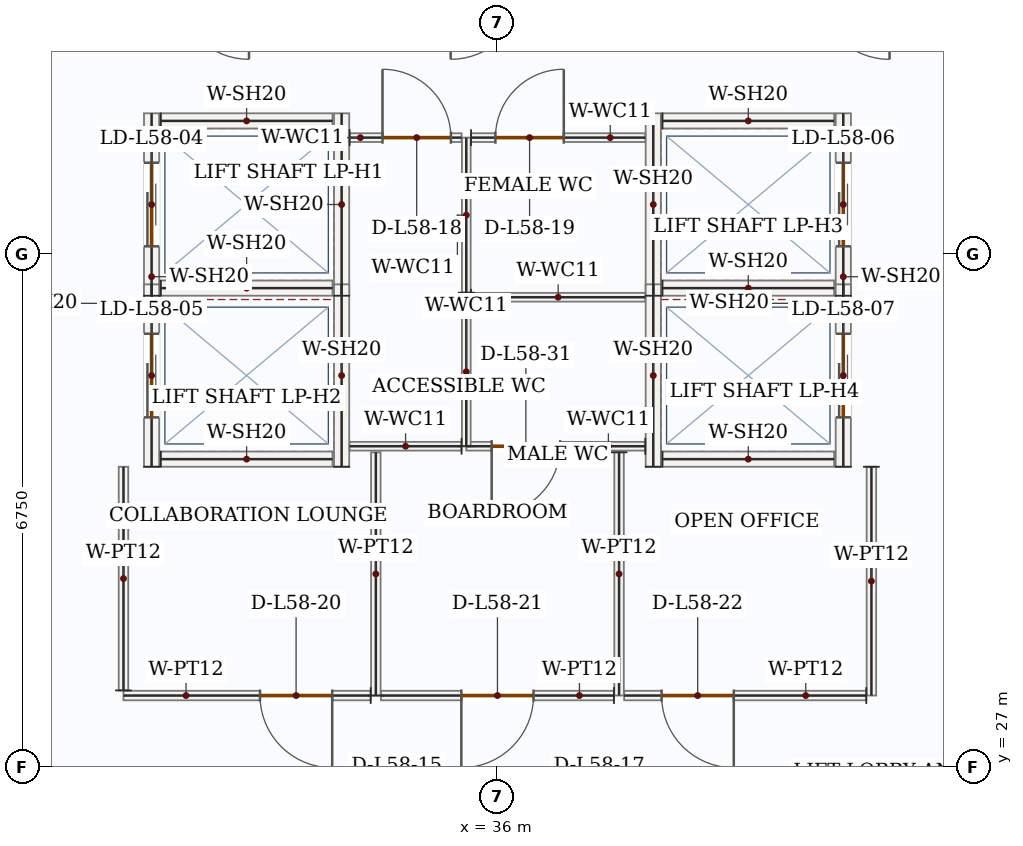
"""IFC4 building model, lengths in metres.
Left out: names, types, materials, properties, quantities, classifications, styles, units other than length and angle.
Written with IfcOpenShell. Run it as: python <this file> out.ifc"""

import sys

from ifc_helpers import new_model, si_unit, direction, frame, frame_2d, origin, place, context, subcontext, project, spatial, rectangle, extrude, source, transform, mapped, element, fill, save


model = new_model("IFC4")
c1 = context("Model", 3, precision=1e-05, world=origin(), true_north=direction((0.0, 1.0)))
c2 = subcontext(c1, "Body", "Model", "MODEL_VIEW")
j1 = project(units=[si_unit("LENGTHUNIT", "METRE"), si_unit("PLANEANGLEUNIT", "RADIAN")], contexts=[c1])
p1 = place(None, origin())
s1 = spatial("IfcSite", under=j1, at=p1, CompositionType="ELEMENT")
p2 = place(p1, origin())
s2 = spatial("IfcBuilding", under=s1, at=p2, CompositionType="ELEMENT")
p3 = place(p2, frame((0.0, 0.0, 246.6)))
s3 = spatial("IfcBuildingStorey", under=s2, at=p3, CompositionType="ELEMENT", Elevation=246.6)
p4 = place(p3, frame((31.45, 33.2, 0.0), z_axis=(0.0, 0.0, 1.0), x_axis=(0.0, 1.0, 0.0)))
e1 = element("IfcWall", 1, at=p4, inside=s3, PredefinedType="SOLIDWALL", context=c2, shape_type="SweptSolid", body=[
    extrude(rectangle(XDim=2.4, YDim=0.2, at=frame_2d((1.2, 0.0))), origin(), (0.0, 0.0, 1.0), 3.5),
])
p5 = place(p4, frame((0.65, 0.0, 0.0)))
e2 = element("IfcOpeningElement", 2, at=p5, cuts=e1, PredefinedType="OPENING", context=c2, shape_type="SweptSolid", body=[
    extrude(rectangle(XDim=1.1, YDim=2.15, at=frame_2d((0.55, 1.075))), frame((0.0, 0.11, 0.0), z_axis=(0.0, -1.0, 0.0), x_axis=(1.0, 0.0, 0.0)), (0.0, 0.0, 1.0), 0.22),
])
m1 = source(origin(), c2, "Body", "SweptSolid", [
    extrude(rectangle(XDim=2.4, YDim=0.2, at=frame_2d((1.2, 0.0))), origin(), (0.0, 0.0, 1.0), 3.5),
])
p6 = place(p3, frame((33.95, 33.2, 0.0), z_axis=(0.0, 0.0, 1.0), x_axis=(0.0, 1.0, 0.0)))
e3 = element("IfcWall", 3, at=p6, inside=s3, PredefinedType="SOLIDWALL", context=c2, shape_type="MappedRepresentation", body=[
    mapped(m1, transform((0.0, 0.0, 0.0), x_axis=(1.0, 0.0, 0.0), y_axis=(0.0, 1.0, 0.0), z_axis=(0.0, 0.0, 1.0), scale=1.0)),
])
m2 = source(origin(), c2, "Body", "SweptSolid", [
    extrude(rectangle(XDim=2.26, YDim=0.2, at=frame_2d((1.13, 0.0))), origin(), (0.0, 0.0, 1.0), 3.5),
])
for number, where, z_axis, x_axis in (
    (4, (31.57, 33.3, 0.0), (0.0, 0.0, 1.0), (1.0, 0.0, 0.0)),
    (5, (31.57, 35.5, 0.0), (0.0, 0.0, 1.0), (1.0, 0.0, 0.0)),
):
    element("IfcWall", number, at=place(p3, frame(where, z_axis=z_axis, x_axis=x_axis)), inside=s3, PredefinedType="SOLIDWALL", context=c2, shape_type="MappedRepresentation", body=[
        mapped(m2, transform((0.0, 0.0, 0.0), x_axis=(1.0, 0.0, 0.0), y_axis=(0.0, 1.0, 0.0), z_axis=(0.0, 0.0, 1.0), scale=1.0)),
    ])
p7 = place(p3, frame((31.45, 30.95, 0.0), z_axis=(0.0, 0.0, 1.0), x_axis=(0.0, 1.0, 0.0)))
e6 = element("IfcWall", 6, at=p7, inside=s3, PredefinedType="SOLIDWALL", context=c2, shape_type="SweptSolid", body=[
    extrude(rectangle(XDim=2.4, YDim=0.2, at=frame_2d((1.2, 0.0))), origin(), (0.0, 0.0, 1.0), 3.5),
])
p8 = place(p7, frame((0.65, 0.0, 0.0)))
e7 = element("IfcOpeningElement", 7, at=p8, cuts=e6, PredefinedType="OPENING", context=c2, shape_type="SweptSolid", body=[
    extrude(rectangle(XDim=1.1, YDim=2.15, at=frame_2d((0.55, 1.075))), frame((0.0, 0.11, 0.0), z_axis=(0.0, -1.0, 0.0), x_axis=(1.0, 0.0, 0.0)), (0.0, 0.0, 1.0), 0.22),
])
p9 = place(p3, frame((33.95, 30.95, 0.0), z_axis=(0.0, 0.0, 1.0), x_axis=(0.0, 1.0, 0.0)))
e8 = element("IfcWall", 8, at=p9, inside=s3, PredefinedType="SOLIDWALL", context=c2, shape_type="MappedRepresentation", body=[
    mapped(m1, transform((0.0, 0.0, 0.0), x_axis=(1.0, 0.0, 0.0), y_axis=(0.0, 1.0, 0.0), z_axis=(0.0, 0.0, 1.0), scale=1.0)),
])
p10 = place(p3, frame((31.57, 31.05, 0.0), z_axis=(0.0, 0.0, 1.0), x_axis=(1.0, 0.0, 0.0)))
e9 = element("IfcWall", 9, at=p10, inside=s3, PredefinedType="SOLIDWALL", context=c2, shape_type="MappedRepresentation", body=[
    mapped(m2, transform((0.0, 0.0, 0.0), x_axis=(1.0, 0.0, 0.0), y_axis=(0.0, 1.0, 0.0), z_axis=(0.0, 0.0, 1.0), scale=1.0)),
])
p11 = place(p3, frame((38.05, 33.2, 0.0), z_axis=(0.0, 0.0, 1.0), x_axis=(0.0, 1.0, 0.0)))
e10 = element("IfcWall", 10, at=p11, inside=s3, PredefinedType="SOLIDWALL", context=c2, shape_type="MappedRepresentation", body=[
    mapped(m1, transform((0.0, 0.0, 0.0), x_axis=(1.0, 0.0, 0.0), y_axis=(0.0, 1.0, 0.0), z_axis=(0.0, 0.0, 1.0), scale=1.0)),
])
p12 = place(p3, frame((40.55, 33.2, 0.0), z_axis=(0.0, 0.0, 1.0), x_axis=(0.0, 1.0, 0.0)))
e11 = element("IfcWall", 11, at=p12, inside=s3, PredefinedType="SOLIDWALL", context=c2, shape_type="SweptSolid", body=[
    extrude(rectangle(XDim=2.4, YDim=0.2, at=frame_2d((1.2, 0.0))), origin(), (0.0, 0.0, 1.0), 3.5),
])
p13 = place(p12, frame((0.65, 0.0, 0.0)))
e12 = element("IfcOpeningElement", 12, at=p13, cuts=e11, PredefinedType="OPENING", context=c2, shape_type="SweptSolid", body=[
    extrude(rectangle(XDim=1.1, YDim=2.15, at=frame_2d((0.55, 1.075))), frame((0.0, 0.11, 0.0), z_axis=(0.0, -1.0, 0.0), x_axis=(1.0, 0.0, 0.0)), (0.0, 0.0, 1.0), 0.22),
])
for number, where, z_axis, x_axis in (
    (13, (38.17, 33.3, 0.0), (0.0, 0.0, 1.0), (1.0, 0.0, 0.0)),
    (14, (38.17, 35.5, 0.0), (0.0, 0.0, 1.0), (1.0, 0.0, 0.0)),
):
    element("IfcWall", number, at=place(p3, frame(where, z_axis=z_axis, x_axis=x_axis)), inside=s3, PredefinedType="SOLIDWALL", context=c2, shape_type="MappedRepresentation", body=[
        mapped(m2, transform((0.0, 0.0, 0.0), x_axis=(1.0, 0.0, 0.0), y_axis=(0.0, 1.0, 0.0), z_axis=(0.0, 0.0, 1.0), scale=1.0)),
    ])
p14 = place(p3, frame((38.05, 30.95, 0.0), z_axis=(0.0, 0.0, 1.0), x_axis=(0.0, 1.0, 0.0)))
e15 = element("IfcWall", 15, at=p14, inside=s3, PredefinedType="SOLIDWALL", context=c2, shape_type="MappedRepresentation", body=[
    mapped(m1, transform((0.0, 0.0, 0.0), x_axis=(1.0, 0.0, 0.0), y_axis=(0.0, 1.0, 0.0), z_axis=(0.0, 0.0, 1.0), scale=1.0)),
])
p15 = place(p3, frame((40.55, 30.95, 0.0), z_axis=(0.0, 0.0, 1.0), x_axis=(0.0, 1.0, 0.0)))
e16 = element("IfcWall", 16, at=p15, inside=s3, PredefinedType="SOLIDWALL", context=c2, shape_type="SweptSolid", body=[
    extrude(rectangle(XDim=2.4, YDim=0.2, at=frame_2d((1.2, 0.0))), origin(), (0.0, 0.0, 1.0), 3.5),
])
p16 = place(p15, frame((0.65, 0.0, 0.0)))
e17 = element("IfcOpeningElement", 17, at=p16, cuts=e16, PredefinedType="OPENING", context=c2, shape_type="SweptSolid", body=[
    extrude(rectangle(XDim=1.1, YDim=2.15, at=frame_2d((0.55, 1.075))), frame((0.0, 0.11, 0.0), z_axis=(0.0, -1.0, 0.0), x_axis=(1.0, 0.0, 0.0)), (0.0, 0.0, 1.0), 0.22),
])
p17 = place(p3, frame((38.17, 31.05, 0.0), z_axis=(0.0, 0.0, 1.0), x_axis=(1.0, 0.0, 0.0)))
e18 = element("IfcWall", 18, at=p17, inside=s3, PredefinedType="SOLIDWALL", context=c2, shape_type="MappedRepresentation", body=[
    mapped(m2, transform((0.0, 0.0, 0.0), x_axis=(1.0, 0.0, 0.0), y_axis=(0.0, 1.0, 0.0), z_axis=(0.0, 0.0, 1.0), scale=1.0)),
])
p18 = place(p3, frame((37.945, 31.22, 0.0), z_axis=(0.0, 0.0, 1.0), x_axis=(-1.0, 0.0, 0.0)))
e19 = element("IfcWall", 19, at=p18, inside=s3, PredefinedType="PARTITIONING", context=c2, shape_type="SweptSolid", body=[
    extrude(rectangle(XDim=2.355, YDim=0.115, at=frame_2d((1.177, 0.0))), origin(), (0.0, 0.0, 1.0), 3.5),
])
p19 = place(p18, frame((1.121, 0.0, 0.0)))
e20 = element("IfcOpeningElement", 20, at=p19, cuts=e19, PredefinedType="OPENING", context=c2, shape_type="SweptSolid", body=[
    extrude(rectangle(XDim=0.9, YDim=2.1, at=frame_2d((0.45, 1.05))), frame((0.0, 0.067, 0.0), z_axis=(0.0, -1.0, 0.0), x_axis=(1.0, 0.0, 0.0)), (0.0, 0.0, 1.0), 0.135),
])
m3 = source(origin(), c2, "Body", "SweptSolid", [
    extrude(rectangle(XDim=1.96, YDim=0.115, at=frame_2d((0.98, 0.0))), origin(), (0.0, 0.0, 1.0), 3.5),
])
p20 = place(p3, frame((35.59, 31.22, 0.0), z_axis=(0.0, 0.0, 1.0), x_axis=(0.0, 1.0, 0.0)))
e21 = element("IfcWall", 21, at=p20, inside=s3, PredefinedType="PARTITIONING", context=c2, shape_type="MappedRepresentation", body=[
    mapped(m3, transform((0.0, 0.0, 0.0), x_axis=(1.0, 0.0, 0.0), y_axis=(0.0, 1.0, 0.0), z_axis=(0.0, 0.0, 1.0), scale=1.0)),
])
m4 = source(origin(), c2, "Body", "SweptSolid", [
    extrude(rectangle(XDim=2.292, YDim=0.115, at=frame_2d((1.146, 0.0))), origin(), (0.0, 0.0, 1.0), 3.5),
])
p21 = place(p3, frame((35.653, 33.18, 0.0), z_axis=(0.0, 0.0, 1.0), x_axis=(1.0, 0.0, 0.0)))
e22 = element("IfcWall", 22, at=p21, inside=s3, PredefinedType="PARTITIONING", context=c2, shape_type="MappedRepresentation", body=[
    mapped(m4, transform((0.0, 0.0, 0.0), x_axis=(1.0, 0.0, 0.0), y_axis=(0.0, 1.0, 0.0), z_axis=(0.0, 0.0, 1.0), scale=1.0)),
])
m5 = source(origin(), c2, "Body", "SweptSolid", [
    extrude(rectangle(XDim=2.04, YDim=0.115, at=frame_2d((1.02, 0.0))), origin(), (0.0, 0.0, 1.0), 3.5),
])
p22 = place(p3, frame((35.59, 33.24, 0.0), z_axis=(0.0, 0.0, 1.0), x_axis=(0.0, 1.0, 0.0)))
e23 = element("IfcWall", 23, at=p22, inside=s3, PredefinedType="PARTITIONING", context=c2, shape_type="MappedRepresentation", body=[
    mapped(m5, transform((0.0, 0.0, 0.0), x_axis=(1.0, 0.0, 0.0), y_axis=(0.0, 1.0, 0.0), z_axis=(0.0, 0.0, 1.0), scale=1.0)),
])
p23 = place(p3, frame((35.653, 35.28, 0.0), z_axis=(0.0, 0.0, 1.0), x_axis=(1.0, 0.0, 0.0)))
e24 = element("IfcWall", 24, at=p23, inside=s3, PredefinedType="PARTITIONING", context=c2, shape_type="SweptSolid", body=[
    extrude(rectangle(XDim=2.292, YDim=0.115, at=frame_2d((1.146, 0.0))), origin(), (0.0, 0.0, 1.0), 3.5),
])
p24 = place(p23, frame((0.32, 0.0, 0.0)))
e25 = element("IfcOpeningElement", 25, at=p24, cuts=e24, PredefinedType="OPENING", context=c2, shape_type="SweptSolid", body=[
    extrude(rectangle(XDim=0.9, YDim=2.1, at=frame_2d((0.45, 1.05))), frame((0.0, 0.067, 0.0), z_axis=(0.0, -1.0, 0.0), x_axis=(1.0, 0.0, 0.0)), (0.0, 0.0, 1.0), 0.135),
])
m6 = source(origin(), c2, "Body", "SweptSolid", [
    extrude(rectangle(XDim=1.473, YDim=0.115, at=frame_2d((0.736, 0.0))), origin(), (0.0, 0.0, 1.0), 3.5),
])
p25 = place(p3, frame((35.528, 31.22, 0.0), z_axis=(0.0, 0.0, 1.0), x_axis=(-1.0, 0.0, 0.0)))
e26 = element("IfcWall", 26, at=p25, inside=s3, PredefinedType="PARTITIONING", context=c2, shape_type="MappedRepresentation", body=[
    mapped(m6, transform((0.0, 0.0, 0.0), x_axis=(1.0, 0.0, 0.0), y_axis=(0.0, 1.0, 0.0), z_axis=(0.0, 0.0, 1.0), scale=1.0)),
])
p26 = place(p3, frame((34.055, 35.28, 0.0), z_axis=(0.0, 0.0, 1.0), x_axis=(1.0, 0.0, 0.0)))
e27 = element("IfcWall", 27, at=p26, inside=s3, PredefinedType="PARTITIONING", context=c2, shape_type="SweptSolid", body=[
    extrude(rectangle(XDim=1.473, YDim=0.115, at=frame_2d((0.736, 0.0))), origin(), (0.0, 0.0, 1.0), 3.5),
])
p27 = place(p26, frame((0.433, 0.0, 0.0)))
e28 = element("IfcOpeningElement", 28, at=p27, cuts=e27, PredefinedType="OPENING", context=c2, shape_type="SweptSolid", body=[
    extrude(rectangle(XDim=0.9, YDim=2.1, at=frame_2d((0.45, 1.05))), frame((0.0, 0.067, 0.0), z_axis=(0.0, -1.0, 0.0), x_axis=(1.0, 0.0, 0.0)), (0.0, 0.0, 1.0), 0.135),
])
m7 = source(origin(), c2, "Body", "SweptSolid", [
    extrude(rectangle(XDim=3.2, YDim=0.125, at=frame_2d((1.6, 0.0))), origin(), (0.0, 0.0, 1.0), 3.5),
])
for number, where, z_axis, x_axis in (
    (29, (34.4, 27.94, 0.0), (0.0, 0.0, 1.0), (0.0, 1.0, 0.0)),
    (30, (37.6, 31.14, 0.0), (0.0, 0.0, 1.0), (0.0, -1.0, 0.0)),
):
    element("IfcWall", number, at=place(p3, frame(where, z_axis=z_axis, x_axis=x_axis)), inside=s3, PredefinedType="PARTITIONING", context=c2, shape_type="MappedRepresentation", body=[
        mapped(m7, transform((0.0, 0.0, 0.0), x_axis=(1.0, 0.0, 0.0), y_axis=(0.0, 1.0, 0.0), z_axis=(0.0, 0.0, 1.0), scale=1.0)),
    ])
p28 = place(p3, frame((37.532, 27.94, 0.0), z_axis=(0.0, 0.0, 1.0), x_axis=(-1.0, 0.0, 0.0)))
e31 = element("IfcWall", 31, at=p28, inside=s3, PredefinedType="PARTITIONING", context=c2, shape_type="SweptSolid", body=[
    extrude(rectangle(XDim=3.065, YDim=0.125, at=frame_2d((1.532, 0.0))), origin(), (0.0, 0.0, 1.0), 3.5),
])
p29 = place(p28, frame((1.058, 0.0, 0.0)))
e32 = element("IfcOpeningElement", 32, at=p29, cuts=e31, PredefinedType="OPENING", context=c2, shape_type="SweptSolid", body=[
    extrude(rectangle(XDim=0.95, YDim=2.15, at=frame_2d((0.475, 1.075))), frame((0.0, 0.073, 0.0), z_axis=(0.0, -1.0, 0.0), x_axis=(1.0, 0.0, 0.0)), (0.0, 0.0, 1.0), 0.145),
])
p30 = place(p3, frame((34.333, 27.94, 0.0), z_axis=(0.0, 0.0, 1.0), x_axis=(-1.0, 0.0, 0.0)))
e33 = element("IfcWall", 33, at=p30, inside=s3, PredefinedType="PARTITIONING", context=c2, shape_type="SweptSolid", body=[
    extrude(rectangle(XDim=3.252, YDim=0.125, at=frame_2d((1.626, 0.0))), origin(), (0.0, 0.0, 1.0), 3.5),
])
p31 = place(p30, frame((0.507, 0.0, 0.0)))
e34 = element("IfcOpeningElement", 34, at=p31, cuts=e33, PredefinedType="OPENING", context=c2, shape_type="SweptSolid", body=[
    extrude(rectangle(XDim=0.95, YDim=2.15, at=frame_2d((0.475, 1.075))), frame((0.0, 0.073, 0.0), z_axis=(0.0, -1.0, 0.0), x_axis=(1.0, 0.0, 0.0)), (0.0, 0.0, 1.0), 0.145),
])
m8 = source(origin(), c2, "Body", "SweptSolid", [
    extrude(rectangle(XDim=2.942, YDim=0.125, at=frame_2d((1.471, 0.0))), origin(), (0.0, 0.0, 1.0), 3.5),
])
p32 = place(p3, frame((31.08, 28.008, 0.0), z_axis=(0.0, 0.0, 1.0), x_axis=(0.0, 1.0, 0.0)))
e35 = element("IfcWall", 35, at=p32, inside=s3, PredefinedType="PARTITIONING", context=c2, shape_type="MappedRepresentation", body=[
    mapped(m8, transform((0.0, 0.0, 0.0), x_axis=(1.0, 0.0, 0.0), y_axis=(0.0, 1.0, 0.0), z_axis=(0.0, 0.0, 1.0), scale=1.0)),
])
m9 = source(origin(), c2, "Body", "SweptSolid", [
    extrude(rectangle(XDim=3.01, YDim=0.125, at=frame_2d((1.505, 0.0))), origin(), (0.0, 0.0, 1.0), 3.5),
])
p33 = place(p3, frame((40.92, 30.95, 0.0), z_axis=(0.0, 0.0, 1.0), x_axis=(0.0, -1.0, 0.0)))
e36 = element("IfcWall", 36, at=p33, inside=s3, PredefinedType="PARTITIONING", context=c2, shape_type="MappedRepresentation", body=[
    mapped(m9, transform((0.0, 0.0, 0.0), x_axis=(1.0, 0.0, 0.0), y_axis=(0.0, 1.0, 0.0), z_axis=(0.0, 0.0, 1.0), scale=1.0)),
])
p34 = place(p3, frame((40.853, 27.94, 0.0), z_axis=(0.0, 0.0, 1.0), x_axis=(-1.0, 0.0, 0.0)))
e37 = element("IfcWall", 37, at=p34, inside=s3, PredefinedType="PARTITIONING", context=c2, shape_type="SweptSolid", body=[
    extrude(rectangle(XDim=3.185, YDim=0.125, at=frame_2d((1.593, 0.0))), origin(), (0.0, 0.0, 1.0), 3.5),
])
p35 = place(p34, frame((1.743, 0.0, 0.0)))
e38 = element("IfcOpeningElement", 38, at=p35, cuts=e37, PredefinedType="OPENING", context=c2, shape_type="SweptSolid", body=[
    extrude(rectangle(XDim=0.95, YDim=2.15, at=frame_2d((0.475, 1.075))), frame((0.0, 0.073, 0.0), z_axis=(0.0, -1.0, 0.0), x_axis=(1.0, 0.0, 0.0)), (0.0, 0.0, 1.0), 0.145),
])
m10 = source(origin(), c2, "Body", "SweptSolid", [
    extrude(rectangle(XDim=1.1, YDim=2.15, at=frame_2d((0.55, 1.075))), frame((0.0, 0.025, 0.0), z_axis=(0.0, -1.0, 0.0), x_axis=(1.0, 0.0, 0.0)), (0.0, 0.0, 1.0), 0.05),
])
p36 = place(p5, origin())
e39 = element("IfcDoor", 39, at=p36, inside=s3, OperationType="DOUBLE_DOOR_SLIDING", PredefinedType="DOOR", context=c2, shape_type="MappedRepresentation", body=[
    mapped(m10, transform((0.0, 0.0, 0.0), x_axis=(1.0, 0.0, 0.0), y_axis=(0.0, 1.0, 0.0), z_axis=(0.0, 0.0, 1.0), scale=1.0)),
])
fill(e2, e39)
p37 = place(p8, origin())
e40 = element("IfcDoor", 40, at=p37, inside=s3, OperationType="DOUBLE_DOOR_SLIDING", PredefinedType="DOOR", context=c2, shape_type="MappedRepresentation", body=[
    mapped(m10, transform((0.0, 0.0, 0.0), x_axis=(1.0, 0.0, 0.0), y_axis=(0.0, 1.0, 0.0), z_axis=(0.0, 0.0, 1.0), scale=1.0)),
])
fill(e7, e40)
p38 = place(p13, origin())
e41 = element("IfcDoor", 41, at=p38, inside=s3, OperationType="DOUBLE_DOOR_SLIDING", PredefinedType="DOOR", context=c2, shape_type="MappedRepresentation", body=[
    mapped(m10, transform((0.0, 0.0, 0.0), x_axis=(1.0, 0.0, 0.0), y_axis=(0.0, 1.0, 0.0), z_axis=(0.0, 0.0, 1.0), scale=1.0)),
])
fill(e12, e41)
p39 = place(p16, origin())
e42 = element("IfcDoor", 42, at=p39, inside=s3, OperationType="DOUBLE_DOOR_SLIDING", PredefinedType="DOOR", context=c2, shape_type="MappedRepresentation", body=[
    mapped(m10, transform((0.0, 0.0, 0.0), x_axis=(1.0, 0.0, 0.0), y_axis=(0.0, 1.0, 0.0), z_axis=(0.0, 0.0, 1.0), scale=1.0)),
])
fill(e17, e42)
m11 = source(origin(), c2, "Body", "SweptSolid", [
    extrude(rectangle(XDim=0.9, YDim=2.1, at=frame_2d((0.45, 1.05))), frame((0.0, 0.025, 0.0), z_axis=(0.0, -1.0, 0.0), x_axis=(1.0, 0.0, 0.0)), (0.0, 0.0, 1.0), 0.05),
])
p40 = place(p27, origin())
e43 = element("IfcDoor", 43, at=p40, inside=s3, OperationType="SINGLE_SWING_LEFT", PredefinedType="DOOR", context=c2, shape_type="MappedRepresentation", body=[
    mapped(m11, transform((0.0, 0.0, 0.0), x_axis=(1.0, 0.0, 0.0), y_axis=(0.0, 1.0, 0.0), z_axis=(0.0, 0.0, 1.0), scale=1.0)),
])
fill(e28, e43)
p41 = place(p24, origin())
e44 = element("IfcDoor", 44, at=p41, inside=s3, OperationType="SINGLE_SWING_RIGHT", PredefinedType="DOOR", context=c2, shape_type="MappedRepresentation", body=[
    mapped(m11, transform((0.0, 0.0, 0.0), x_axis=(1.0, 0.0, 0.0), y_axis=(0.0, 1.0, 0.0), z_axis=(0.0, 0.0, 1.0), scale=1.0)),
])
fill(e25, e44)
m12 = source(origin(), c2, "Body", "SweptSolid", [
    extrude(rectangle(XDim=0.95, YDim=2.15, at=frame_2d((0.475, 1.075))), frame((0.0, 0.025, 0.0), z_axis=(0.0, -1.0, 0.0), x_axis=(1.0, 0.0, 0.0)), (0.0, 0.0, 1.0), 0.05),
])
p42 = place(p31, origin())
e45 = element("IfcDoor", 45, at=p42, inside=s3, OperationType="SINGLE_SWING_LEFT", PredefinedType="DOOR", context=c2, shape_type="MappedRepresentation", body=[
    mapped(m12, transform((0.0, 0.0, 0.0), x_axis=(1.0, 0.0, 0.0), y_axis=(0.0, 1.0, 0.0), z_axis=(0.0, 0.0, 1.0), scale=1.0)),
])
fill(e34, e45)
p43 = place(p29, origin())
e46 = element("IfcDoor", 46, at=p43, inside=s3, OperationType="SINGLE_SWING_RIGHT", PredefinedType="DOOR", context=c2, shape_type="MappedRepresentation", body=[
    mapped(m12, transform((0.0, 0.0, 0.0), x_axis=(1.0, 0.0, 0.0), y_axis=(0.0, 1.0, 0.0), z_axis=(0.0, 0.0, 1.0), scale=1.0)),
])
fill(e32, e46)
p44 = place(p35, origin())
e47 = element("IfcDoor", 47, at=p44, inside=s3, OperationType="SINGLE_SWING_LEFT", PredefinedType="DOOR", context=c2, shape_type="MappedRepresentation", body=[
    mapped(m12, transform((0.0, 0.0, 0.0), x_axis=(1.0, 0.0, 0.0), y_axis=(0.0, 1.0, 0.0), z_axis=(0.0, 0.0, 1.0), scale=1.0)),
])
fill(e38, e47)
p45 = place(p19, origin())
e48 = element("IfcDoor", 48, at=p45, inside=s3, OperationType="SINGLE_SWING_RIGHT", PredefinedType="DOOR", context=c2, shape_type="MappedRepresentation", body=[
    mapped(m11, transform((0.0, 0.0, 0.0), x_axis=(1.0, 0.0, 0.0), y_axis=(0.0, 1.0, 0.0), z_axis=(0.0, 0.0, 1.0), scale=1.0)),
])
fill(e20, e48)
save(model, sys.argv[1])
